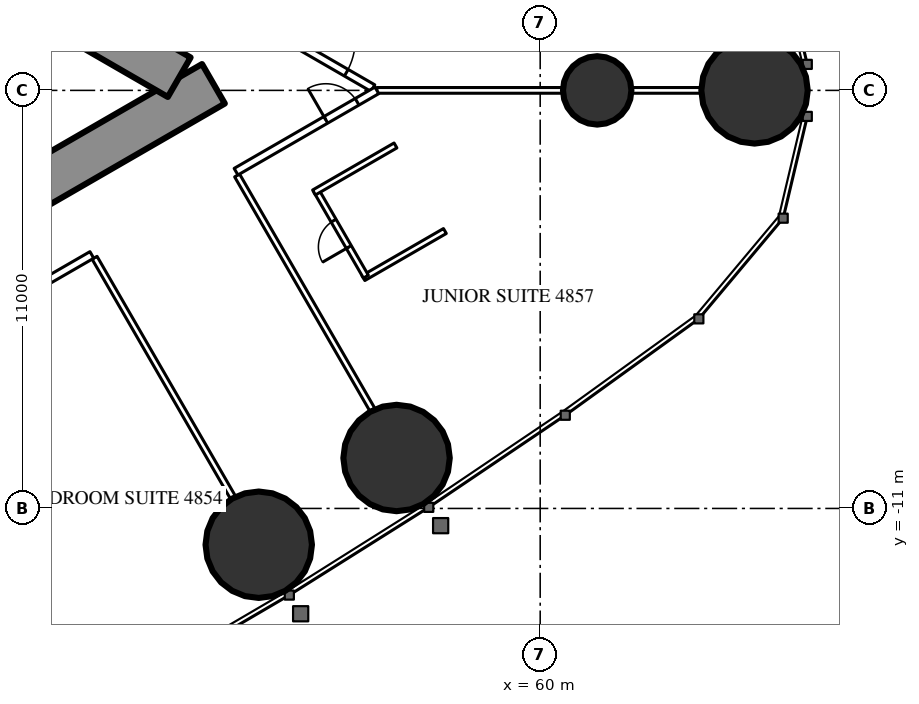
"""IFC4 building model, lengths in metres.
Left out: names, types, materials, properties, quantities, classifications, styles, units other than length and angle.
Written with IfcOpenShell. Run it as: python <this file> out.ifc"""

import sys

from ifc_helpers import new_model, si_unit, direction, frame, frame_2d, origin, origin_2d, place, context, subcontext, project, spatial, rectangle, circle, extrude, element, fill, save


model = new_model("IFC4")
c1 = context("Model", 3, precision=1e-05, world=origin(), true_north=direction((0.0, 1.0)))
c2 = subcontext(c1, "Body", "Model", "MODEL_VIEW")
j1 = project(units=[si_unit("LENGTHUNIT", "METRE"), si_unit("PLANEANGLEUNIT", "RADIAN")], contexts=[c1])
p1 = place(None, origin())
s1 = spatial("IfcSite", under=j1, at=p1, CompositionType="ELEMENT")
p2 = place(p1, origin())
s2 = spatial("IfcBuilding", under=s1, at=p2, CompositionType="ELEMENT")
p3 = place(p2, frame((0.0, 0.0, 180.8)))
s3 = spatial("IfcBuildingStorey", under=s2, at=p3, CompositionType="ELEMENT", Elevation=180.8)
for number, where, z_axis, x_axis in (
    (1, (65.64, 0.0, 0.0), (0.0, 0.0, 1.0), (1.0, 0.0, 0.0)),
    (2, (52.594, -11.955, 0.0), (0.0, 0.0, 1.0), (1.0, 0.0, 0.0)),
    (3, (56.221, -9.672, 0.0), (0.0, 0.0, 1.0), (1.0, 0.0, 0.0)),
):
    element("IfcColumn", number, at=place(p3, frame(where, z_axis=z_axis, x_axis=x_axis)), inside=s3, PredefinedType="COLUMN", context=c2, shape_type="SweptSolid", body=[
        extrude(circle(Radius=1.4, at=origin_2d()), origin(), (0.0, 0.0, 1.0), 3.5),
    ])
p4 = place(p3, frame((61.5, 0.0, 0.0), z_axis=(0.0, 0.0, 1.0), x_axis=(1.0, 0.0, 0.0)))
e4 = element("IfcColumn", 4, at=p4, inside=s3, PredefinedType="COLUMN", context=c2, shape_type="SweptSolid", body=[
    extrude(circle(Radius=0.9, at=origin_2d()), origin(), (0.0, 0.0, 1.0), 3.5),
])
p5 = place(p3, frame((27.2, -13.8, 0.0), z_axis=(0.0, 0.0, 1.0), x_axis=(0.866027159892, 0.499996958321, 0.0)))
e5 = element("IfcWall", 5, at=p5, inside=s3, PredefinedType="SHEAR", context=c2, shape_type="SweptSolid", body=[
    extrude(rectangle(XDim=27.947, YDim=1.2, at=frame_2d((13.973, 0.0))), origin(), (0.0, 0.0, 1.0), 3.5),
])
p6 = place(p5, frame((4.6, 0.0, 0.0)))
e6 = element("IfcOpeningElement", 6, at=p6, cuts=e5, PredefinedType="OPENING", context=c2, shape_type="SweptSolid", body=[
    extrude(rectangle(XDim=1.0, YDim=2.2, at=frame_2d((0.5, 1.1))), frame((0.0, 0.61, 0.0), z_axis=(0.0, -1.0, 0.0), x_axis=(1.0, 0.0, 0.0)), (0.0, 0.0, 1.0), 1.22),
])
p7 = place(p5, frame((13.395, 0.0, 0.0)))
e7 = element("IfcOpeningElement", 7, at=p7, cuts=e5, PredefinedType="OPENING", context=c2, shape_type="SweptSolid", body=[
    extrude(rectangle(XDim=1.8, YDim=2.2, at=frame_2d((0.9, 1.1))), frame((0.0, 0.61, 0.0), z_axis=(0.0, -1.0, 0.0), x_axis=(1.0, 0.0, 0.0)), (0.0, 0.0, 1.0), 1.22),
])
p8 = place(p3, frame((27.2, 13.8, 0.0), z_axis=(0.0, 0.0, 1.0), x_axis=(0.866024515034, -0.500001539357, 0.0)))
e8 = element("IfcWall", 8, at=p8, inside=s3, PredefinedType="SHEAR", context=c2, shape_type="SweptSolid", body=[
    extrude(rectangle(XDim=26.907, YDim=1.2, at=frame_2d((13.454, 0.0))), origin(), (0.0, 0.0, 1.0), 3.5),
])
p9 = place(p8, frame((4.6, 0.0, 0.0)))
e9 = element("IfcOpeningElement", 9, at=p9, cuts=e8, PredefinedType="OPENING", context=c2, shape_type="SweptSolid", body=[
    extrude(rectangle(XDim=1.0, YDim=2.2, at=frame_2d((0.5, 1.1))), frame((0.0, 0.61, 0.0), z_axis=(0.0, -1.0, 0.0), x_axis=(1.0, 0.0, 0.0)), (0.0, 0.0, 1.0), 1.22),
])
p10 = place(p8, frame((13.395, 0.0, 0.0)))
e10 = element("IfcOpeningElement", 10, at=p10, cuts=e8, PredefinedType="OPENING", context=c2, shape_type="SweptSolid", body=[
    extrude(rectangle(XDim=1.8, YDim=2.2, at=frame_2d((0.9, 1.1))), frame((0.0, 0.61, 0.0), z_axis=(0.0, -1.0, 0.0), x_axis=(1.0, 0.0, 0.0)), (0.0, 0.0, 1.0), 1.22),
])
p11 = place(p3, frame((48.275, -4.404, 0.0), z_axis=(0.0, 0.0, 1.0), x_axis=(0.500006004368, -0.866021937133, 0.0)))
e11 = element("IfcWall", 11, at=p11, inside=s3, PredefinedType="PARTITIONING", context=c2, shape_type="SweptSolid", body=[
    extrude(rectangle(XDim=7.279, YDim=0.15, at=frame_2d((3.64, 0.0))), origin(), (0.0, 0.0, 1.0), 2.3),
])
p12 = place(p3, frame((52.025, -2.238, 0.0), z_axis=(0.0, 0.0, 1.0), x_axis=(0.499983785035, -0.866034765296, 0.0)))
e12 = element("IfcWall", 12, at=p12, inside=s3, PredefinedType="PARTITIONING", context=c2, shape_type="SweptSolid", body=[
    extrude(rectangle(XDim=7.116, YDim=0.15, at=frame_2d((3.558, 0.0))), origin(), (0.0, 0.0, 1.0), 2.3),
])
p13 = place(p3, frame((55.702, 0.0, 0.0), z_axis=(0.0, 0.0, 1.0), x_axis=(1.0, 0.0, 0.0)))
e13 = element("IfcWall", 13, at=p13, inside=s3, PredefinedType="PARTITIONING", context=c2, shape_type="SweptSolid", body=[
    extrude(rectangle(XDim=8.518, YDim=0.15, at=frame_2d((4.259, 0.0))), origin(), (0.0, 0.0, 1.0), 2.3),
])
p14 = place(p3, frame((52.639, 1.769, 0.0), z_axis=(0.0, 0.0, 1.0), x_axis=(0.866027340901, -0.4999966448, 0.0)))
e14 = element("IfcWall", 14, at=p14, inside=s3, PredefinedType="PARTITIONING", context=c2, shape_type="SweptSolid", body=[
    extrude(rectangle(XDim=3.417, YDim=0.2, at=frame_2d((1.708, 0.0))), origin(), (0.0, 0.0, 1.0), 3.25),
])
p15 = place(p14, frame((0.809, 0.0, 0.0)))
e15 = element("IfcOpeningElement", 15, at=p15, cuts=e14, PredefinedType="OPENING", context=c2, shape_type="SweptSolid", body=[
    extrude(rectangle(XDim=1.8, YDim=2.2, at=frame_2d((0.9, 1.1))), frame((0.0, 0.11, 0.0), z_axis=(0.0, -1.0, 0.0), x_axis=(1.0, 0.0, 0.0)), (0.0, 0.0, 1.0), 0.22),
])
p16 = place(p3, frame((27.959, -16.017, 0.0), z_axis=(0.0, 0.0, 1.0), x_axis=(0.866024180982, 0.50000211795, 0.0)))
e16 = element("IfcWall", 16, at=p16, inside=s3, PredefinedType="PARTITIONING", context=c2, shape_type="SweptSolid", body=[
    extrude(rectangle(XDim=23.375, YDim=0.2, at=frame_2d((11.688, 0.0))), origin(), (0.0, 0.0, 1.0), 3.25),
])
p17 = place(p16, frame((2.415, 0.0, 0.0)))
e17 = element("IfcOpeningElement", 17, at=p17, cuts=e16, PredefinedType="OPENING", context=c2, shape_type="SweptSolid", body=[
    extrude(rectangle(XDim=0.95, YDim=2.2, at=frame_2d((0.475, 1.1))), frame((0.0, 0.11, 0.0), z_axis=(0.0, -1.0, 0.0), x_axis=(1.0, 0.0, 0.0)), (0.0, 0.0, 1.0), 0.22),
])
p18 = place(p16, frame((9.215, 0.0, 0.0)))
e18 = element("IfcOpeningElement", 18, at=p18, cuts=e16, PredefinedType="OPENING", context=c2, shape_type="SweptSolid", body=[
    extrude(rectangle(XDim=1.0, YDim=2.2, at=frame_2d((0.5, 1.1))), frame((0.0, 0.11, 0.0), z_axis=(0.0, -1.0, 0.0), x_axis=(1.0, 0.0, 0.0)), (0.0, 0.0, 1.0), 0.22),
])
p19 = place(p16, frame((15.109, 0.0, 0.0)))
e19 = element("IfcOpeningElement", 19, at=p19, cuts=e16, PredefinedType="OPENING", context=c2, shape_type="SweptSolid", body=[
    extrude(rectangle(XDim=0.95, YDim=2.2, at=frame_2d((0.475, 1.1))), frame((0.0, 0.11, 0.0), z_axis=(0.0, -1.0, 0.0), x_axis=(1.0, 0.0, 0.0)), (0.0, 0.0, 1.0), 0.22),
])
p20 = place(p3, frame((51.997, -2.139, 0.0), z_axis=(0.0, 0.0, 1.0), x_axis=(0.866036399848, 0.499980953776, 0.0)))
e20 = element("IfcWall", 20, at=p20, inside=s3, PredefinedType="PARTITIONING", context=c2, shape_type="SweptSolid", body=[
    extrude(rectangle(XDim=4.279, YDim=0.2, at=frame_2d((2.139, 0.0))), origin(), (0.0, 0.0, 1.0), 3.25),
])
p21 = place(p20, frame((2.729, 0.0, 0.0)))
e21 = element("IfcOpeningElement", 21, at=p21, cuts=e20, PredefinedType="OPENING", context=c2, shape_type="SweptSolid", body=[
    extrude(rectangle(XDim=0.95, YDim=2.2, at=frame_2d((0.475, 1.1))), frame((0.0, 0.11, 0.0), z_axis=(0.0, -1.0, 0.0), x_axis=(1.0, 0.0, 0.0)), (0.0, 0.0, 1.0), 0.22),
])
p22 = place(p3, frame((55.349, -4.938, 0.0), z_axis=(0.0, 0.0, 1.0), x_axis=(0.866006523861, 0.500032699561, 0.0)))
e22 = element("IfcWall", 22, at=p22, inside=s3, PredefinedType="PARTITIONING", context=c2, shape_type="SweptSolid", body=[
    extrude(rectangle(XDim=2.475, YDim=0.15, at=frame_2d((1.237, 0.0))), origin(), (0.0, 0.0, 1.0), 3.25),
])
p23 = place(p3, frame((54.114, -2.649, 0.0), z_axis=(0.0, 0.0, 1.0), x_axis=(0.500006934395, -0.866021400173, 0.0)))
e23 = element("IfcWall", 23, at=p23, inside=s3, PredefinedType="PARTITIONING", context=c2, shape_type="SweptSolid", body=[
    extrude(rectangle(XDim=2.6, YDim=0.15, at=frame_2d((1.3, 0.0))), origin(), (0.0, 0.0, 1.0), 3.25),
])
p24 = place(p23, frame((0.9, 0.0, 0.0)))
e24 = element("IfcOpeningElement", 24, at=p24, cuts=e23, PredefinedType="OPENING", context=c2, shape_type="SweptSolid", body=[
    extrude(rectangle(XDim=0.8, YDim=2.2, at=frame_2d((0.4, 1.1))), frame((0.0, 0.085, 0.0), z_axis=(0.0, -1.0, 0.0), x_axis=(1.0, 0.0, 0.0)), (0.0, 0.0, 1.0), 0.17),
])
p25 = place(p3, frame((54.049, -2.687, 0.0), z_axis=(0.0, 0.0, 1.0), x_axis=(0.866006523861, 0.500032699561, 0.0)))
e25 = element("IfcWall", 25, at=p25, inside=s3, PredefinedType="PARTITIONING", context=c2, shape_type="SweptSolid", body=[
    extrude(rectangle(XDim=2.475, YDim=0.15, at=frame_2d((1.237, 0.0))), origin(), (0.0, 0.0, 1.0), 3.25),
])
p26 = place(p24, origin())
e26 = element("IfcDoor", 26, at=p26, inside=s3, OperationType="SINGLE_SWING_RIGHT", PredefinedType="DOOR", context=c2, shape_type="SweptSolid", body=[
    extrude(rectangle(XDim=0.8, YDim=2.2, at=frame_2d((0.4, 1.1))), frame((0.0, 0.025, 0.0), z_axis=(0.0, -1.0, 0.0), x_axis=(1.0, 0.0, 0.0)), (0.0, 0.0, 1.0), 0.05),
])
fill(e24, e26)
p27 = place(p21, origin())
e27 = element("IfcDoor", 27, at=p27, inside=s3, OperationType="SINGLE_SWING_LEFT", PredefinedType="DOOR", context=c2, shape_type="SweptSolid", body=[
    extrude(rectangle(XDim=0.95, YDim=2.2, at=frame_2d((0.475, 1.1))), frame((0.0, 0.025, 0.0), z_axis=(0.0, -1.0, 0.0), x_axis=(1.0, 0.0, 0.0)), (0.0, 0.0, 1.0), 0.05),
])
fill(e21, e27)
p28 = place(p15, origin())
e28 = element("IfcDoor", 28, at=p28, inside=s3, OperationType="DOUBLE_DOOR_SINGLE_SWING", PredefinedType="DOOR", context=c2, shape_type="SweptSolid", body=[
    extrude(rectangle(XDim=1.8, YDim=2.2, at=frame_2d((0.9, 1.1))), frame((0.0, 0.025, 0.0), z_axis=(0.0, -1.0, 0.0), x_axis=(1.0, 0.0, 0.0)), (0.0, 0.0, 1.0), 0.05),
])
fill(e15, e28)
save(model, sys.argv[1])
